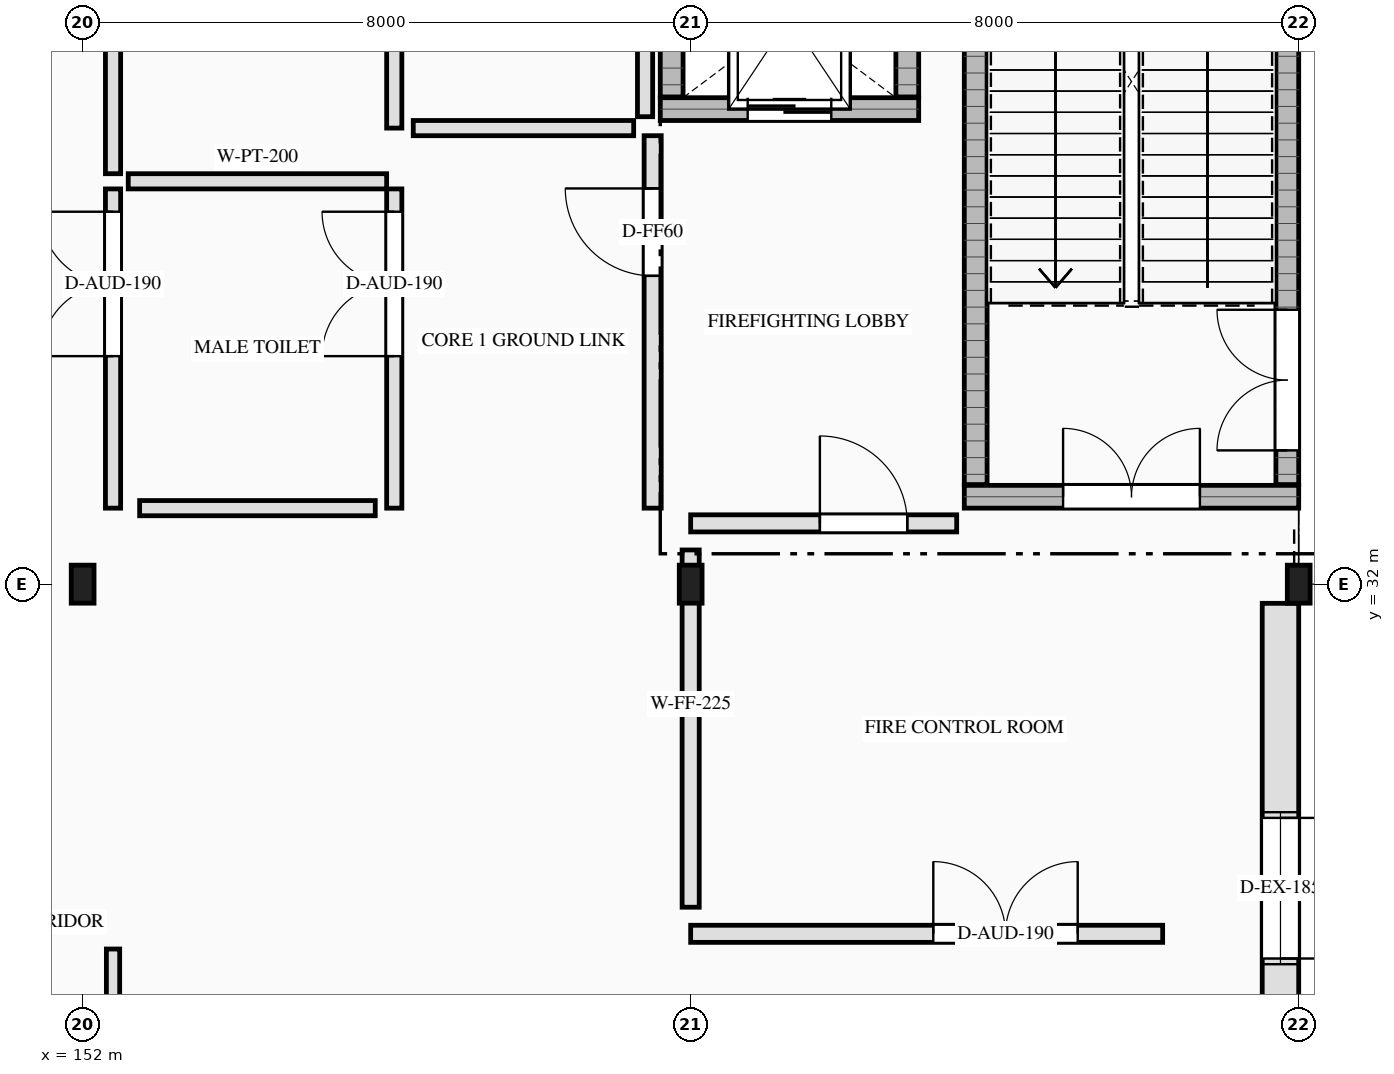
"""IFC4 building model, lengths in metres.
Left out: names, types, materials, properties, quantities, classifications, styles, units other than length and angle.
Written with IfcOpenShell. Run it as: python <this file> out.ifc"""

import sys

from ifc_helpers import new_model, si_unit, direction, frame, frame_2d, origin, origin_2d, place, context, subcontext, project, spatial, rectangle, i_section, extrude, element, fill, save


model = new_model("IFC4")
c1 = context("Model", 3, precision=1e-05, world=origin(), true_north=direction((0.0, 1.0)))
c2 = subcontext(c1, "Body", "Model", "MODEL_VIEW")
j1 = project(units=[si_unit("LENGTHUNIT", "METRE"), si_unit("PLANEANGLEUNIT", "RADIAN")], contexts=[c1])
p1 = place(None, origin())
s1 = spatial("IfcSite", under=j1, at=p1, CompositionType="ELEMENT")
p2 = place(p1, origin())
s2 = spatial("IfcBuilding", under=s1, at=p2, CompositionType="ELEMENT")
p3 = place(p2, origin())
s3 = spatial("IfcBuildingStorey", under=s2, at=p3, CompositionType="ELEMENT", Elevation=0.0)
p4 = place(p3, frame((163.6, 33.15, 0.0), z_axis=(0.0, 0.0, 1.0), x_axis=(1.0, 0.0, 0.0)))
e1 = element("IfcWall", 1, at=p4, inside=s3, PredefinedType="SHEAR", context=c2, shape_type="SweptSolid", body=[
    extrude(rectangle(XDim=4.4, YDim=0.3, at=frame_2d((2.2, 0.0))), origin(), (0.0, 0.0, 1.0), 5.4),
])
p5 = place(p4, frame((1.3, 0.0, 0.0)))
e2 = element("IfcOpeningElement", 2, at=p5, cuts=e1, PredefinedType="OPENING", context=c2, shape_type="SweptSolid", body=[
    extrude(rectangle(XDim=1.8, YDim=2.2, at=frame_2d((0.9, 1.1))), frame((0.0, 0.16, 0.0), z_axis=(0.0, -1.0, 0.0), x_axis=(1.0, 0.0, 0.0)), (0.0, 0.0, 1.0), 0.32),
])
p6 = place(p3, frame((163.75, 33.31, 0.0), z_axis=(0.0, 0.0, 1.0), x_axis=(0.0, 1.0, 0.0)))
e3 = element("IfcWall", 3, at=p6, inside=s3, PredefinedType="SHEAR", context=c2, shape_type="SweptSolid", body=[
    extrude(rectangle(XDim=9.38, YDim=0.3, at=frame_2d((4.69, 0.0))), origin(), (0.0, 0.0, 1.0), 5.4),
])
p7 = place(p3, frame((167.85, 33.31, 0.0), z_axis=(0.0, 0.0, 1.0), x_axis=(0.0, 1.0, 0.0)))
e4 = element("IfcWall", 4, at=p7, inside=s3, PredefinedType="SHEAR", context=c2, shape_type="SweptSolid", body=[
    extrude(rectangle(XDim=9.38, YDim=0.3, at=frame_2d((4.69, 0.0))), origin(), (0.0, 0.0, 1.0), 5.4),
])
p8 = place(p7, frame((0.45, 0.0, 0.0)))
e5 = element("IfcOpeningElement", 5, at=p8, cuts=e4, PredefinedType="OPENING", context=c2, shape_type="SweptSolid", body=[
    extrude(rectangle(XDim=1.85, YDim=2.3, at=frame_2d((0.925, 1.15))), frame((0.0, 0.16, 0.0), z_axis=(0.0, -1.0, 0.0), x_axis=(1.0, 0.0, 0.0)), (0.0, 0.0, 1.0), 0.32),
])
p9 = place(p3, frame((159.6, 38.25, 0.0), z_axis=(0.0, 0.0, 1.0), x_axis=(1.0, 0.0, 0.0)))
e6 = element("IfcWall", 6, at=p9, inside=s3, PredefinedType="SHEAR", context=c2, shape_type="SweptSolid", body=[
    extrude(rectangle(XDim=3.4, YDim=0.3, at=frame_2d((1.7, 0.0))), origin(), (0.0, 0.0, 1.0), 5.4),
])
p10 = place(p9, frame((1.15, 0.0, 0.0)))
e7 = element("IfcOpeningElement", 7, at=p10, cuts=e6, PredefinedType="OPENING", context=c2, shape_type="SweptSolid", body=[
    extrude(rectangle(XDim=1.1, YDim=2.15, at=frame_2d((0.55, 1.075))), frame((0.0, 0.16, 0.0), z_axis=(0.0, -1.0, 0.0), x_axis=(1.0, 0.0, 0.0)), (0.0, 0.0, 1.0), 0.32),
])
for number, where, z_axis, x_axis in (
    (8, (159.75, 38.41, 0.0), (0.0, 0.0, 1.0), (0.0, 1.0, 0.0)),
    (9, (162.85, 38.41, 0.0), (0.0, 0.0, 1.0), (0.0, 1.0, 0.0)),
):
    element("IfcWall", number, at=place(p3, frame(where, z_axis=z_axis, x_axis=x_axis)), inside=s3, PredefinedType="SHEAR", context=c2, shape_type="SweptSolid", body=[
        extrude(rectangle(XDim=2.08, YDim=0.3, at=frame_2d((1.04, 0.0))), origin(), (0.0, 0.0, 1.0), 5.4),
    ])
for number, where, z_axis, x_axis in (
    (10, (152.0, 32.0, 0.0), (0.0, 0.0, 1.0), (1.0, 0.0, 0.0)),
    (11, (160.0, 32.0, 0.0), (0.0, 0.0, 1.0), (1.0, 0.0, 0.0)),
    (12, (168.0, 32.0, 0.0), (0.0, 0.0, 1.0), (1.0, 0.0, 0.0)),
):
    element("IfcColumn", number, at=place(p3, frame(where, z_axis=z_axis, x_axis=x_axis)), inside=s3, PredefinedType="COLUMN", context=c2, shape_type="SweptSolid", body=[
        extrude(i_section(OverallWidth=0.3, OverallDepth=0.5, WebThickness=0.014, FlangeThickness=0.028, FilletRadius=0.027, at=origin_2d()), origin(), (0.0, 0.0, 1.0), 5.4),
    ])
p11 = place(p3, frame((167.76, 31.748, 0.0), z_axis=(0.0, 0.0, 1.0), x_axis=(0.0, -1.0, 0.0)))
e13 = element("IfcWall", 13, at=p11, inside=s3, PredefinedType="SOLIDWALL", context=c2, shape_type="SweptSolid", body=[
    extrude(rectangle(XDim=7.496, YDim=0.48, at=frame_2d((3.748, 0.0))), origin(), (0.0, 0.0, 1.0), 4.835),
])
p12 = place(p11, frame((2.823, 0.0, 0.0)))
e14 = element("IfcOpeningElement", 14, at=p12, cuts=e13, PredefinedType="OPENING", context=c2, shape_type="SweptSolid", body=[
    extrude(rectangle(XDim=1.85, YDim=2.3, at=frame_2d((0.925, 1.15))), frame((0.0, 0.25, 0.0), z_axis=(0.0, -1.0, 0.0), x_axis=(1.0, 0.0, 0.0)), (0.0, 0.0, 1.0), 0.5),
])
p13 = place(p11, frame((2.748, 0.0, 2.52)))
e15 = element("IfcOpeningElement", 15, at=p13, cuts=e13, PredefinedType="OPENING", context=c2, shape_type="SweptSolid", body=[
    extrude(rectangle(XDim=2.0, YDim=1.1, at=frame_2d((1.0, 0.55))), frame((0.0, 0.25, 0.0), z_axis=(0.0, -1.0, 0.0), x_axis=(1.0, 0.0, 0.0)), (0.0, 0.0, 1.0), 0.5),
])
p14 = place(p3, frame((160.0, 32.8, 0.0), z_axis=(0.0, 0.0, 1.0), x_axis=(1.0, 0.0, 0.0)))
e16 = element("IfcWall", 16, at=p14, inside=s3, PredefinedType="SOLIDWALL", context=c2, shape_type="SweptSolid", body=[
    extrude(rectangle(XDim=3.5, YDim=0.225, at=frame_2d((1.75, 0.0))), origin(), (0.0, 0.0, 1.0), 5.16),
])
p15 = place(p14, frame((1.7, 0.0, 0.0)))
e17 = element("IfcOpeningElement", 17, at=p15, cuts=e16, PredefinedType="OPENING", context=c2, shape_type="SweptSolid", body=[
    extrude(rectangle(XDim=1.15, YDim=2.2, at=frame_2d((0.575, 1.1))), frame((0.0, 0.123, 0.0), z_axis=(0.0, -1.0, 0.0), x_axis=(1.0, 0.0, 0.0)), (0.0, 0.0, 1.0), 0.245),
])
p16 = place(p3, frame((159.5, 33.0, 0.0), z_axis=(0.0, 0.0, 1.0), x_axis=(0.0, 1.0, 0.0)))
e18 = element("IfcWall", 18, at=p16, inside=s3, PredefinedType="SOLIDWALL", context=c2, shape_type="SweptSolid", body=[
    extrude(rectangle(XDim=4.9, YDim=0.225, at=frame_2d((2.45, 0.0))), origin(), (0.0, 0.0, 1.0), 5.16),
])
p17 = place(p16, frame((3.056, 0.0, 0.0)))
e19 = element("IfcOpeningElement", 19, at=p17, cuts=e18, PredefinedType="OPENING", context=c2, shape_type="SweptSolid", body=[
    extrude(rectangle(XDim=1.15, YDim=2.2, at=frame_2d((0.575, 1.1))), frame((0.0, 0.123, 0.0), z_axis=(0.0, -1.0, 0.0), x_axis=(1.0, 0.0, 0.0)), (0.0, 0.0, 1.0), 0.245),
])
p18 = place(p3, frame((152.6, 37.3, 0.0), z_axis=(0.0, 0.0, 1.0), x_axis=(1.0, 0.0, 0.0)))
e20 = element("IfcWall", 20, at=p18, inside=s3, PredefinedType="PARTITIONING", context=c2, shape_type="SweptSolid", body=[
    extrude(rectangle(XDim=3.4, YDim=0.2, at=frame_2d((1.7, 0.0))), origin(), (0.0, 0.0, 1.0), 5.16),
])
p19 = place(p3, frame((152.4, 33.0, 0.0), z_axis=(0.0, 0.0, 1.0), x_axis=(0.0, 1.0, 0.0)))
e21 = element("IfcWall", 21, at=p19, inside=s3, PredefinedType="PARTITIONING", context=c2, shape_type="SweptSolid", body=[
    extrude(rectangle(XDim=4.2, YDim=0.2, at=frame_2d((2.1, 0.0))), origin(), (0.0, 0.0, 1.0), 5.16),
])
p20 = place(p19, frame((2.0, 0.0, 0.0)))
e22 = element("IfcOpeningElement", 22, at=p20, cuts=e21, PredefinedType="OPENING", context=c2, shape_type="SweptSolid", body=[
    extrude(rectangle(XDim=1.9, YDim=2.35, at=frame_2d((0.95, 1.175))), frame((0.0, 0.11, 0.0), z_axis=(0.0, -1.0, 0.0), x_axis=(1.0, 0.0, 0.0)), (0.0, 0.0, 1.0), 0.22),
])
p21 = place(p3, frame((156.1, 33.0, 0.0), z_axis=(0.0, 0.0, 1.0), x_axis=(0.0, 1.0, 0.0)))
e23 = element("IfcWall", 23, at=p21, inside=s3, PredefinedType="PARTITIONING", context=c2, shape_type="SweptSolid", body=[
    extrude(rectangle(XDim=4.2, YDim=0.2, at=frame_2d((2.1, 0.0))), origin(), (0.0, 0.0, 1.0), 5.16),
])
p22 = place(p21, frame((2.0, 0.0, 0.0)))
e24 = element("IfcOpeningElement", 24, at=p22, cuts=e23, PredefinedType="OPENING", context=c2, shape_type="SweptSolid", body=[
    extrude(rectangle(XDim=1.9, YDim=2.35, at=frame_2d((0.95, 1.175))), frame((0.0, 0.11, 0.0), z_axis=(0.0, -1.0, 0.0), x_axis=(1.0, 0.0, 0.0)), (0.0, 0.0, 1.0), 0.22),
])
p23 = place(p3, frame((156.1, 38.0, 0.0), z_axis=(0.0, 0.0, 1.0), x_axis=(0.0, 1.0, 0.0)))
e25 = element("IfcWall", 25, at=p23, inside=s3, PredefinedType="PARTITIONING", context=c2, shape_type="SweptSolid", body=[
    extrude(rectangle(XDim=3.6, YDim=0.2, at=frame_2d((1.8, 0.0))), origin(), (0.0, 0.0, 1.0), 5.16),
])
p24 = place(p3, frame((152.4, 37.4, 0.0), z_axis=(0.0, 0.0, 1.0), x_axis=(0.0, 1.0, 0.0)))
e26 = element("IfcWall", 26, at=p24, inside=s3, PredefinedType="PARTITIONING", context=c2, shape_type="SweptSolid", body=[
    extrude(rectangle(XDim=4.2, YDim=0.2, at=frame_2d((2.1, 0.0))), origin(), (0.0, 0.0, 1.0), 5.16),
])
p25 = place(p3, frame((160.0, 27.4, 0.0), z_axis=(0.0, 0.0, 1.0), x_axis=(1.0, 0.0, 0.0)))
e27 = element("IfcWall", 27, at=p25, inside=s3, PredefinedType="SOLIDWALL", context=c2, shape_type="SweptSolid", body=[
    extrude(rectangle(XDim=6.21, YDim=0.225, at=frame_2d((3.105, 0.0))), origin(), (0.0, 0.0, 1.0), 5.16),
])
p26 = place(p25, frame((3.192, 0.0, 0.0)))
e28 = element("IfcOpeningElement", 28, at=p26, cuts=e27, PredefinedType="OPENING", context=c2, shape_type="SweptSolid", body=[
    extrude(rectangle(XDim=1.9, YDim=2.35, at=frame_2d((0.95, 1.175))), frame((0.0, 0.123, 0.0), z_axis=(0.0, -1.0, 0.0), x_axis=(1.0, 0.0, 0.0)), (0.0, 0.0, 1.0), 0.245),
])
p27 = place(p3, frame((152.4, 13.6, 0.0), z_axis=(0.0, 0.0, 1.0), x_axis=(0.0, 1.0, 0.0)))
e29 = element("IfcWall", 29, at=p27, inside=s3, PredefinedType="PARTITIONING", context=c2, shape_type="SweptSolid", body=[
    extrude(rectangle(XDim=13.6, YDim=0.175, at=frame_2d((6.8, 0.0))), origin(), (0.0, 0.0, 1.0), 5.16),
])
p28 = place(p27, frame((5.313, 0.0, 0.0)))
e30 = element("IfcOpeningElement", 30, at=p28, cuts=e29, PredefinedType="OPENING", context=c2, shape_type="SweptSolid", body=[
    extrude(rectangle(XDim=1.9, YDim=2.35, at=frame_2d((0.95, 1.175))), frame((0.0, 0.097, 0.0), z_axis=(0.0, -1.0, 0.0), x_axis=(1.0, 0.0, 0.0)), (0.0, 0.0, 1.0), 0.195),
])
p29 = place(p3, frame((152.75, 33.0, 0.0), z_axis=(0.0, 0.0, 1.0), x_axis=(1.0, 0.0, 0.0)))
e31 = element("IfcWall", 31, at=p29, inside=s3, PredefinedType="PARTITIONING", context=c2, shape_type="SweptSolid", body=[
    extrude(rectangle(XDim=3.1, YDim=0.2, at=frame_2d((1.55, 0.0))), origin(), (0.0, 0.0, 1.0), 5.16),
])
p30 = place(p3, frame((156.35, 38.0, 0.0), z_axis=(0.0, 0.0, 1.0), x_axis=(1.0, 0.0, 0.0)))
e32 = element("IfcWall", 32, at=p30, inside=s3, PredefinedType="PARTITIONING", context=c2, shape_type="SweptSolid", body=[
    extrude(rectangle(XDim=2.9, YDim=0.2, at=frame_2d((1.45, 0.0))), origin(), (0.0, 0.0, 1.0), 5.16),
])
p31 = place(p3, frame((159.4, 38.15, 0.0), z_axis=(0.0, 0.0, 1.0), x_axis=(0.0, 1.0, 0.0)))
e33 = element("IfcWall", 33, at=p31, inside=s3, PredefinedType="PARTITIONING", context=c2, shape_type="SweptSolid", body=[
    extrude(rectangle(XDim=3.3, YDim=0.2, at=frame_2d((1.65, 0.0))), origin(), (0.0, 0.0, 1.0), 5.16),
])
p32 = place(p3, frame((160.0, 27.75, 0.0), z_axis=(0.0, 0.0, 1.0), x_axis=(0.0, 1.0, 0.0)))
e34 = element("IfcWall", 34, at=p32, inside=s3, PredefinedType="SOLIDWALL", context=c2, shape_type="SweptSolid", body=[
    extrude(rectangle(XDim=4.7, YDim=0.225, at=frame_2d((2.35, 0.0))), origin(), (0.0, 0.0, 1.0), 4.72),
])
p33 = place(p12, origin())
e35 = element("IfcDoor", 35, at=p33, inside=s3, OperationType="DOUBLE_DOOR_SINGLE_SWING", PredefinedType="DOOR", context=c2, shape_type="SweptSolid", body=[
    extrude(rectangle(XDim=1.85, YDim=2.3, at=frame_2d((0.925, 1.15))), frame((0.0, 0.025, 0.0), z_axis=(0.0, -1.0, 0.0), x_axis=(1.0, 0.0, 0.0)), (0.0, 0.0, 1.0), 0.05),
])
fill(e14, e35)
p34 = place(p13, origin())
e36 = element("IfcWindow", 36, at=p34, inside=s3, PartitioningType="DOUBLE_PANEL_HORIZONTAL", PredefinedType="WINDOW", context=c2, shape_type="SweptSolid", body=[
    extrude(rectangle(XDim=2.0, YDim=1.1, at=frame_2d((1.0, 0.55))), frame((0.0, 0.03, 0.0), z_axis=(0.0, -1.0, 0.0), x_axis=(1.0, 0.0, 0.0)), (0.0, 0.0, 1.0), 0.06),
])
fill(e15, e36)
p35 = place(p8, origin())
e37 = element("IfcDoor", 37, at=p35, inside=s3, OperationType="DOUBLE_DOOR_SINGLE_SWING", PredefinedType="DOOR", context=c2, shape_type="SweptSolid", body=[
    extrude(rectangle(XDim=1.85, YDim=2.3, at=frame_2d((0.925, 1.15))), frame((0.0, 0.025, 0.0), z_axis=(0.0, -1.0, 0.0), x_axis=(1.0, 0.0, 0.0)), (0.0, 0.0, 1.0), 0.05),
])
fill(e5, e37)
p36 = place(p5, origin())
e38 = element("IfcDoor", 38, at=p36, inside=s3, OperationType="DOUBLE_DOOR_SINGLE_SWING", PredefinedType="DOOR", context=c2, shape_type="SweptSolid", body=[
    extrude(rectangle(XDim=1.8, YDim=2.2, at=frame_2d((0.9, 1.1))), frame((0.0, 0.025, 0.0), z_axis=(0.0, -1.0, 0.0), x_axis=(1.0, 0.0, 0.0)), (0.0, 0.0, 1.0), 0.05),
])
fill(e2, e38)
p37 = place(p10, origin())
e39 = element("IfcDoor", 39, at=p37, inside=s3, OperationType="SLIDING_TO_LEFT", PredefinedType="DOOR", context=c2, shape_type="SweptSolid", body=[
    extrude(rectangle(XDim=1.1, YDim=2.15, at=frame_2d((0.55, 1.075))), frame((0.0, 0.025, 0.0), z_axis=(0.0, -1.0, 0.0), x_axis=(1.0, 0.0, 0.0)), (0.0, 0.0, 1.0), 0.05),
])
fill(e7, e39)
p38 = place(p15, origin())
e40 = element("IfcDoor", 40, at=p38, inside=s3, OperationType="SINGLE_SWING_LEFT", PredefinedType="DOOR", context=c2, shape_type="SweptSolid", body=[
    extrude(rectangle(XDim=1.15, YDim=2.2, at=frame_2d((0.575, 1.1))), frame((0.0, 0.025, 0.0), z_axis=(0.0, -1.0, 0.0), x_axis=(1.0, 0.0, 0.0)), (0.0, 0.0, 1.0), 0.05),
])
fill(e17, e40)
p39 = place(p17, origin())
e41 = element("IfcDoor", 41, at=p39, inside=s3, OperationType="SINGLE_SWING_RIGHT", PredefinedType="DOOR", context=c2, shape_type="SweptSolid", body=[
    extrude(rectangle(XDim=1.15, YDim=2.2, at=frame_2d((0.575, 1.1))), frame((0.0, 0.025, 0.0), z_axis=(0.0, -1.0, 0.0), x_axis=(1.0, 0.0, 0.0)), (0.0, 0.0, 1.0), 0.05),
])
fill(e19, e41)
p40 = place(p20, origin())
e42 = element("IfcDoor", 42, at=p40, inside=s3, OperationType="DOUBLE_DOOR_SINGLE_SWING", PredefinedType="DOOR", context=c2, shape_type="SweptSolid", body=[
    extrude(rectangle(XDim=1.9, YDim=2.35, at=frame_2d((0.95, 1.175))), frame((0.0, 0.025, 0.0), z_axis=(0.0, -1.0, 0.0), x_axis=(1.0, 0.0, 0.0)), (0.0, 0.0, 1.0), 0.05),
])
fill(e22, e42)
p41 = place(p22, origin())
e43 = element("IfcDoor", 43, at=p41, inside=s3, OperationType="DOUBLE_DOOR_SINGLE_SWING", PredefinedType="DOOR", context=c2, shape_type="SweptSolid", body=[
    extrude(rectangle(XDim=1.9, YDim=2.35, at=frame_2d((0.95, 1.175))), frame((0.0, 0.025, 0.0), z_axis=(0.0, -1.0, 0.0), x_axis=(1.0, 0.0, 0.0)), (0.0, 0.0, 1.0), 0.05),
])
fill(e24, e43)
p42 = place(p26, origin())
e44 = element("IfcDoor", 44, at=p42, inside=s3, OperationType="DOUBLE_DOOR_SINGLE_SWING", PredefinedType="DOOR", context=c2, shape_type="SweptSolid", body=[
    extrude(rectangle(XDim=1.9, YDim=2.35, at=frame_2d((0.95, 1.175))), frame((0.0, 0.025, 0.0), z_axis=(0.0, -1.0, 0.0), x_axis=(1.0, 0.0, 0.0)), (0.0, 0.0, 1.0), 0.05),
])
fill(e28, e44)
save(model, sys.argv[1])
